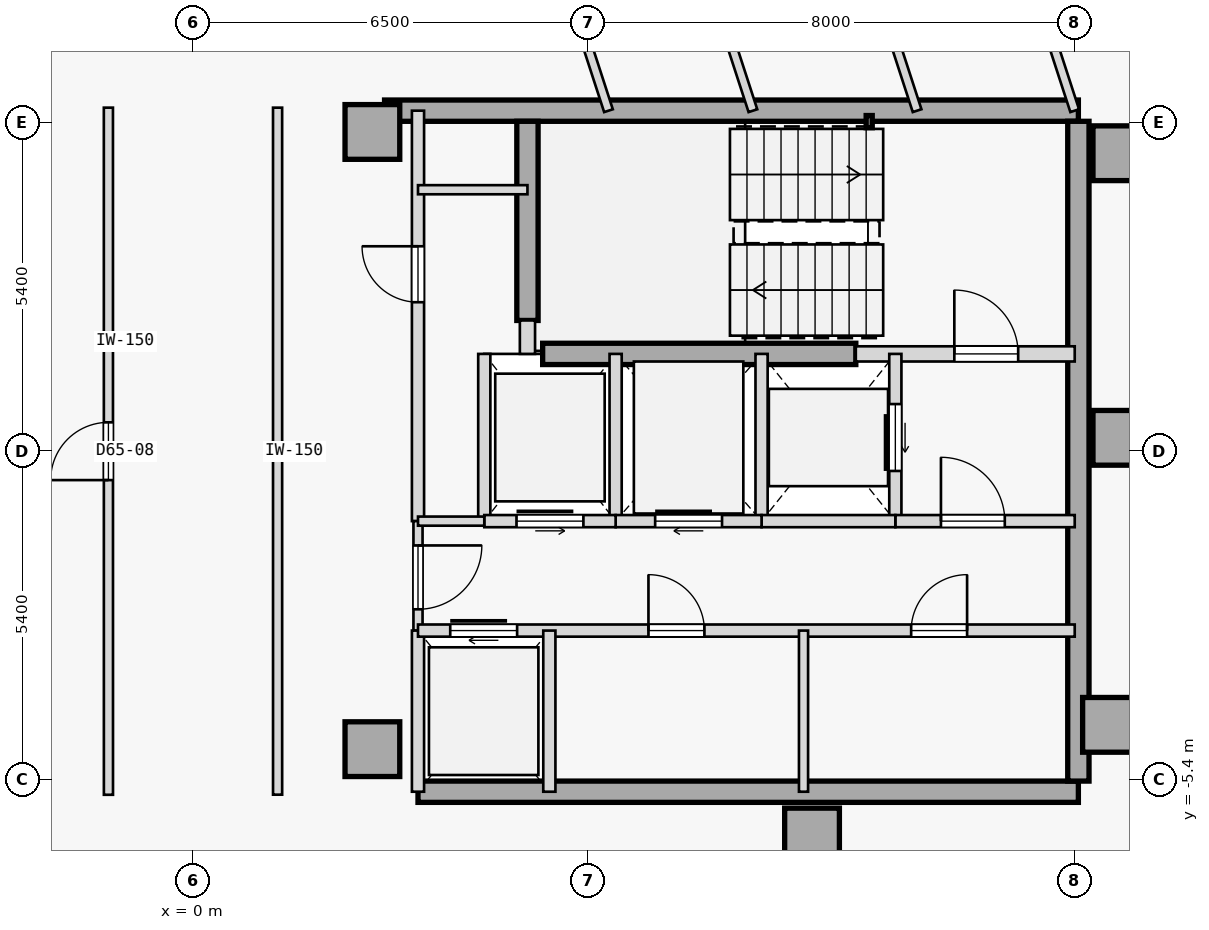
"""IFC4 building model, lengths in metres.
Left out: names, types, materials, properties, quantities, classifications, styles, units other than length and angle.
Written with IfcOpenShell. Run it as: python <this file> out.ifc"""

import sys

from ifc_helpers import new_model, si_unit, direction, frame, frame_2d, origin, origin_2d, place, context, subcontext, project, spatial, rectangle, hollow_rectangle, extrude, element, fill, save


model = new_model("IFC4")
c1 = context("Model", 3, precision=1e-05, world=origin(), true_north=direction((0.0, 1.0)))
c2 = subcontext(c1, "Body", "Model", "MODEL_VIEW")
j1 = project(units=[si_unit("LENGTHUNIT", "METRE"), si_unit("PLANEANGLEUNIT", "RADIAN")], contexts=[c1])
p1 = place(None, origin())
s1 = spatial("IfcSite", under=j1, at=p1, CompositionType="ELEMENT")
p2 = place(p1, origin())
s2 = spatial("IfcBuilding", under=s1, at=p2, CompositionType="ELEMENT")
p3 = place(p2, frame((0.0, 0.0, 244.4)))
s3 = spatial("IfcBuildingStorey", under=s2, at=p3, CompositionType="ELEMENT", Elevation=244.4)
for number, where, z_axis, x_axis in (
    (1, (15.25, 4.9, 0.0), (0.0, 0.0, 1.0), (1.0, 0.0, 0.0)),
    (2, (15.25, 0.22, 0.0), (0.0, 0.0, 1.0), (1.0, 0.0, 0.0)),
    (3, (15.08, -4.5, 0.0), (0.0, 0.0, 1.0), (1.0, 0.0, 0.0)),
    (4, (10.18, -6.32, 0.0), (0.0, 0.0, 1.0), (1.0, 0.0, 0.0)),
    (5, (2.95, -4.9, 0.0), (0.0, 0.0, 1.0), (1.0, 0.0, 0.0)),
    (6, (2.95, 5.25, 0.0), (0.0, 0.0, 1.0), (1.0, 0.0, 0.0)),
):
    element("IfcColumn", number, at=place(p3, frame(where, z_axis=z_axis, x_axis=x_axis)), inside=s3, PredefinedType="COLUMN", context=c2, shape_type="SweptSolid", body=[
        extrude(rectangle(XDim=0.9, YDim=0.9, at=origin_2d()), origin(), (0.0, 0.0, 1.0), 3.35),
    ])
p4 = place(p3, frame((3.15, 5.6, 0.0), z_axis=(0.0, 0.0, 1.0), x_axis=(1.0, 0.0, 0.0)))
e7 = element("IfcWall", 7, at=p4, inside=s3, PredefinedType="SHEAR", context=c2, shape_type="SweptSolid", body=[
    extrude(rectangle(XDim=11.41, YDim=0.35, at=frame_2d((5.705, 0.0))), origin(), (0.0, 0.0, 1.0), 3.125),
])
p5 = place(p3, frame((3.7, -5.6, 0.0), z_axis=(0.0, 0.0, 1.0), x_axis=(1.0, 0.0, 0.0)))
e8 = element("IfcWall", 8, at=p5, inside=s3, PredefinedType="SHEAR", context=c2, shape_type="SweptSolid", body=[
    extrude(rectangle(XDim=10.86, YDim=0.35, at=frame_2d((5.43, 0.0))), origin(), (0.0, 0.0, 1.0), 3.125),
])
p6 = place(p3, frame((14.56, -5.425, 0.0), z_axis=(0.0, 0.0, 1.0), x_axis=(0.0, 1.0, 0.0)))
e9 = element("IfcWall", 9, at=p6, inside=s3, PredefinedType="SHEAR", context=c2, shape_type="SweptSolid", body=[
    extrude(rectangle(XDim=10.85, YDim=0.35, at=frame_2d((5.425, 0.0))), origin(), (0.0, 0.0, 1.0), 3.125),
])
p7 = place(p3, frame((5.5, 2.15, 0.0), z_axis=(0.0, 0.0, 1.0), x_axis=(0.0, 1.0, 0.0)))
e10 = element("IfcWall", 10, at=p7, inside=s3, PredefinedType="SHEAR", context=c2, shape_type="SweptSolid", body=[
    extrude(rectangle(XDim=3.275, YDim=0.35, at=frame_2d((1.638, 0.0))), origin(), (0.0, 0.0, 1.0), 3.125),
])
p8 = place(p3, frame((5.75, 1.6, 0.0), z_axis=(0.0, 0.0, 1.0), x_axis=(1.0, 0.0, 0.0)))
e11 = element("IfcWall", 11, at=p8, inside=s3, PredefinedType="SHEAR", context=c2, shape_type="SweptSolid", body=[
    extrude(rectangle(XDim=5.15, YDim=0.35, at=frame_2d((2.575, 0.0))), origin(), (0.0, 0.0, 1.0), 3.125),
])
p9 = place(p3, frame((11.12, 5.42, 0.0), z_axis=(0.0, 0.0, 1.0), x_axis=(1.0, 0.0, 0.0)))
e12 = element("IfcColumn", 12, at=p9, inside=s3, PredefinedType="COLUMN", context=c2, shape_type="SweptSolid", body=[
    extrude(hollow_rectangle(XDim=0.1, YDim=0.2, WallThickness=0.008, at=origin_2d()), origin(), (0.0, 0.0, 1.0), 3.35),
])
p10 = place(p3, frame((10.9, 1.6, 0.0), z_axis=(0.0, 0.0, 1.0), x_axis=(1.0, 0.0, 0.0)))
e13 = element("IfcWall", 13, at=p10, inside=s3, PredefinedType="STANDARD", context=c2, shape_type="SweptSolid", body=[
    extrude(rectangle(XDim=3.6, YDim=0.25, at=frame_2d((1.8, 0.0))), origin(), (0.0, 0.0, 1.0), 3.125),
])
p11 = place(p10, frame((1.62, 0.0, 0.0)))
e14 = element("IfcOpeningElement", 14, at=p11, cuts=e13, PredefinedType="OPENING", context=c2, shape_type="SweptSolid", body=[
    extrude(rectangle(XDim=1.05, YDim=2.15, at=frame_2d((0.525, 1.075))), frame((0.0, 0.135, 0.0), z_axis=(0.0, -1.0, 0.0), x_axis=(1.0, 0.0, 0.0)), (0.0, 0.0, 1.0), 0.27),
])
p12 = place(p3, frame((5.5, 1.6, 0.0), z_axis=(0.0, 0.0, 1.0), x_axis=(0.0, 1.0, 0.0)))
e15 = element("IfcWall", 15, at=p12, inside=s3, PredefinedType="STANDARD", context=c2, shape_type="SweptSolid", body=[
    extrude(rectangle(XDim=0.55, YDim=0.25, at=frame_2d((0.275, 0.0))), origin(), (0.0, 0.0, 1.0), 3.125),
])
p13 = place(p3, frame((3.7, -1.15, 0.0), z_axis=(0.0, 0.0, 1.0), x_axis=(0.0, 1.0, 0.0)))
e16 = element("IfcWall", 16, at=p13, inside=s3, PredefinedType="STANDARD", context=c2, shape_type="SweptSolid", body=[
    extrude(rectangle(XDim=6.75, YDim=0.2, at=frame_2d((3.375, 0.0))), origin(), (0.0, 0.0, 1.0), 3.125),
])
p14 = place(p13, frame((3.6, 0.0, 0.0)))
e17 = element("IfcOpeningElement", 17, at=p14, cuts=e16, PredefinedType="OPENING", context=c2, shape_type="SweptSolid", body=[
    extrude(rectangle(XDim=0.92, YDim=2.15, at=frame_2d((0.46, 1.075))), frame((0.0, 0.11, 0.0), z_axis=(0.0, -1.0, 0.0), x_axis=(1.0, 0.0, 0.0)), (0.0, 0.0, 1.0), 0.22),
])
p15 = place(p3, frame((3.7, -2.95, 0.0), z_axis=(0.0, 0.0, 1.0), x_axis=(0.0, 1.0, 0.0)))
e18 = element("IfcWall", 18, at=p15, inside=s3, PredefinedType="PARTITIONING", context=c2, shape_type="SweptSolid", body=[
    extrude(rectangle(XDim=1.8, YDim=0.15, at=frame_2d((0.9, 0.0))), origin(), (0.0, 0.0, 1.0), 3.125),
])
p16 = place(p15, frame((0.35, 0.0, 0.0)))
e19 = element("IfcOpeningElement", 19, at=p16, cuts=e18, PredefinedType="OPENING", context=c2, shape_type="SweptSolid", body=[
    extrude(rectangle(XDim=1.05, YDim=2.18, at=frame_2d((0.525, 1.09))), frame((0.0, 0.085, 0.0), z_axis=(0.0, -1.0, 0.0), x_axis=(1.0, 0.0, 0.0)), (0.0, 0.0, 1.0), 0.17),
])
p17 = place(p3, frame((3.7, -5.6, 0.0), z_axis=(0.0, 0.0, 1.0), x_axis=(0.0, 1.0, 0.0)))
e20 = element("IfcWall", 20, at=p17, inside=s3, PredefinedType="STANDARD", context=c2, shape_type="SweptSolid", body=[
    extrude(rectangle(XDim=2.65, YDim=0.2, at=frame_2d((1.325, 0.0))), origin(), (0.0, 0.0, 1.0), 3.125),
])
p18 = place(p3, frame((11.55, -1.15, 0.0), z_axis=(0.0, 0.0, 1.0), x_axis=(0.0, 1.0, 0.0)))
e21 = element("IfcWall", 21, at=p18, inside=s3, PredefinedType="STANDARD", context=c2, shape_type="SweptSolid", body=[
    extrude(rectangle(XDim=2.75, YDim=0.2, at=frame_2d((1.375, 0.0))), origin(), (0.0, 0.0, 1.0), 3.125),
])
p19 = place(p18, frame((0.825, 0.0, 0.0)))
e22 = element("IfcOpeningElement", 22, at=p19, cuts=e21, PredefinedType="OPENING", context=c2, shape_type="SweptSolid", body=[
    extrude(rectangle(XDim=1.1, YDim=2.15, at=frame_2d((0.55, 1.075))), frame((0.0, 0.11, 0.0), z_axis=(0.0, -1.0, 0.0), x_axis=(1.0, 0.0, 0.0)), (0.0, 0.0, 1.0), 0.22),
])
p20 = place(p3, frame((9.35, -1.15, 0.0), z_axis=(0.0, 0.0, 1.0), x_axis=(0.0, 1.0, 0.0)))
e23 = element("IfcWall", 23, at=p20, inside=s3, PredefinedType="STANDARD", context=c2, shape_type="SweptSolid", body=[
    extrude(rectangle(XDim=2.75, YDim=0.2, at=frame_2d((1.375, 0.0))), origin(), (0.0, 0.0, 1.0), 3.125),
])
p21 = place(p3, frame((11.55, -1.15, 0.0), z_axis=(0.0, 0.0, 1.0), x_axis=(1.0, 0.0, 0.0)))
e24 = element("IfcWall", 24, at=p21, inside=s3, PredefinedType="STANDARD", context=c2, shape_type="SweptSolid", body=[
    extrude(rectangle(XDim=2.95, YDim=0.2, at=frame_2d((1.475, 0.0))), origin(), (0.0, 0.0, 1.0), 3.125),
])
p22 = place(p21, frame((0.75, 0.0, 0.0)))
e25 = element("IfcOpeningElement", 25, at=p22, cuts=e24, PredefinedType="OPENING", context=c2, shape_type="SweptSolid", body=[
    extrude(rectangle(XDim=1.05, YDim=2.18, at=frame_2d((0.525, 1.09))), frame((0.0, 0.11, 0.0), z_axis=(0.0, -1.0, 0.0), x_axis=(1.0, 0.0, 0.0)), (0.0, 0.0, 1.0), 0.22),
])
p23 = place(p3, frame((9.35, -1.15, 0.0), z_axis=(0.0, 0.0, 1.0), x_axis=(1.0, 0.0, 0.0)))
e26 = element("IfcWall", 26, at=p23, inside=s3, PredefinedType="STANDARD", context=c2, shape_type="SweptSolid", body=[
    extrude(rectangle(XDim=2.2, YDim=0.2, at=frame_2d((1.1, 0.0))), origin(), (0.0, 0.0, 1.0), 3.125),
])
p24 = place(p3, frame((6.95, -1.15, 0.0), z_axis=(0.0, 0.0, 1.0), x_axis=(0.0, 1.0, 0.0)))
e27 = element("IfcWall", 27, at=p24, inside=s3, PredefinedType="STANDARD", context=c2, shape_type="SweptSolid", body=[
    extrude(rectangle(XDim=2.75, YDim=0.2, at=frame_2d((1.375, 0.0))), origin(), (0.0, 0.0, 1.0), 3.125),
])
p25 = place(p3, frame((6.95, -1.15, 0.0), z_axis=(0.0, 0.0, 1.0), x_axis=(1.0, 0.0, 0.0)))
e28 = element("IfcWall", 28, at=p25, inside=s3, PredefinedType="STANDARD", context=c2, shape_type="SweptSolid", body=[
    extrude(rectangle(XDim=2.4, YDim=0.2, at=frame_2d((1.2, 0.0))), origin(), (0.0, 0.0, 1.0), 3.125),
])
p26 = place(p25, frame((0.65, 0.0, 0.0)))
e29 = element("IfcOpeningElement", 29, at=p26, cuts=e28, PredefinedType="OPENING", context=c2, shape_type="SweptSolid", body=[
    extrude(rectangle(XDim=1.1, YDim=2.15, at=frame_2d((0.55, 1.075))), frame((0.0, 0.11, 0.0), z_axis=(0.0, -1.0, 0.0), x_axis=(1.0, 0.0, 0.0)), (0.0, 0.0, 1.0), 0.22),
])
p27 = place(p3, frame((4.79, -1.15, 0.0), z_axis=(0.0, 0.0, 1.0), x_axis=(0.0, 1.0, 0.0)))
e30 = element("IfcWall", 30, at=p27, inside=s3, PredefinedType="STANDARD", context=c2, shape_type="SweptSolid", body=[
    extrude(rectangle(XDim=2.75, YDim=0.2, at=frame_2d((1.375, 0.0))), origin(), (0.0, 0.0, 1.0), 3.125),
])
p28 = place(p3, frame((4.79, -1.15, 0.0), z_axis=(0.0, 0.0, 1.0), x_axis=(1.0, 0.0, 0.0)))
e31 = element("IfcWall", 31, at=p28, inside=s3, PredefinedType="STANDARD", context=c2, shape_type="SweptSolid", body=[
    extrude(rectangle(XDim=2.16, YDim=0.2, at=frame_2d((1.08, 0.0))), origin(), (0.0, 0.0, 1.0), 3.125),
])
p29 = place(p28, frame((0.53, 0.0, 0.0)))
e32 = element("IfcOpeningElement", 32, at=p29, cuts=e31, PredefinedType="OPENING", context=c2, shape_type="SweptSolid", body=[
    extrude(rectangle(XDim=1.1, YDim=2.15, at=frame_2d((0.55, 1.075))), frame((0.0, 0.11, 0.0), z_axis=(0.0, -1.0, 0.0), x_axis=(1.0, 0.0, 0.0)), (0.0, 0.0, 1.0), 0.22),
])
p30 = place(p3, frame((3.7, -1.15, 0.0), z_axis=(0.0, 0.0, 1.0), x_axis=(1.0, 0.0, 0.0)))
e33 = element("IfcWall", 33, at=p30, inside=s3, PredefinedType="PARTITIONING", context=c2, shape_type="SweptSolid", body=[
    extrude(rectangle(XDim=1.09, YDim=0.15, at=frame_2d((0.545, 0.0))), origin(), (0.0, 0.0, 1.0), 3.125),
])
p31 = place(p3, frame((3.7, -2.95, 0.0), z_axis=(0.0, 0.0, 1.0), x_axis=(1.0, 0.0, 0.0)))
e34 = element("IfcWall", 34, at=p31, inside=s3, PredefinedType="STANDARD", context=c2, shape_type="SweptSolid", body=[
    extrude(rectangle(XDim=10.8, YDim=0.2, at=frame_2d((5.4, 0.0))), origin(), (0.0, 0.0, 1.0), 3.125),
])
p32 = place(p31, frame((0.53, 0.0, 0.0)))
e35 = element("IfcOpeningElement", 35, at=p32, cuts=e34, PredefinedType="OPENING", context=c2, shape_type="SweptSolid", body=[
    extrude(rectangle(XDim=1.1, YDim=2.15, at=frame_2d((0.55, 1.075))), frame((0.0, 0.11, 0.0), z_axis=(0.0, -1.0, 0.0), x_axis=(1.0, 0.0, 0.0)), (0.0, 0.0, 1.0), 0.22),
])
p33 = place(p31, frame((3.79, 0.0, 0.0)))
e36 = element("IfcOpeningElement", 36, at=p33, cuts=e34, PredefinedType="OPENING", context=c2, shape_type="SweptSolid", body=[
    extrude(rectangle(XDim=0.92, YDim=2.15, at=frame_2d((0.46, 1.075))), frame((0.0, 0.11, 0.0), z_axis=(0.0, -1.0, 0.0), x_axis=(1.0, 0.0, 0.0)), (0.0, 0.0, 1.0), 0.22),
])
p34 = place(p31, frame((8.11, 0.0, 0.0)))
e37 = element("IfcOpeningElement", 37, at=p34, cuts=e34, PredefinedType="OPENING", context=c2, shape_type="SweptSolid", body=[
    extrude(rectangle(XDim=0.92, YDim=2.15, at=frame_2d((0.46, 1.075))), frame((0.0, 0.11, 0.0), z_axis=(0.0, -1.0, 0.0), x_axis=(1.0, 0.0, 0.0)), (0.0, 0.0, 1.0), 0.22),
])
p35 = place(p3, frame((5.86, -5.6, 0.0), z_axis=(0.0, 0.0, 1.0), x_axis=(0.0, 1.0, 0.0)))
e38 = element("IfcWall", 38, at=p35, inside=s3, PredefinedType="STANDARD", context=c2, shape_type="SweptSolid", body=[
    extrude(rectangle(XDim=2.65, YDim=0.2, at=frame_2d((1.325, 0.0))), origin(), (0.0, 0.0, 1.0), 3.125),
])
p36 = place(p3, frame((10.04, -5.6, 0.0), z_axis=(0.0, 0.0, 1.0), x_axis=(0.0, 1.0, 0.0)))
e39 = element("IfcWall", 39, at=p36, inside=s3, PredefinedType="PARTITIONING", context=c2, shape_type="SweptSolid", body=[
    extrude(rectangle(XDim=2.65, YDim=0.15, at=frame_2d((1.325, 0.0))), origin(), (0.0, 0.0, 1.0), 3.125),
])
p37 = place(p3, frame((3.7, 4.3, 0.0), z_axis=(0.0, 0.0, 1.0), x_axis=(1.0, 0.0, 0.0)))
e40 = element("IfcWall", 40, at=p37, inside=s3, PredefinedType="PARTITIONING", context=c2, shape_type="SweptSolid", body=[
    extrude(rectangle(XDim=1.8, YDim=0.15, at=frame_2d((0.9, 0.0))), origin(), (0.0, 0.0, 1.0), 3.125),
])
p38 = place(p3, frame((-1.391, -5.65, 0.0), z_axis=(0.0, 0.0, 1.0), x_axis=(-8.6422954e-05, 0.999999996266, 0.0)))
e41 = element("IfcWall", 41, at=p38, inside=s3, PredefinedType="PARTITIONING", context=c2, shape_type="SweptSolid", body=[
    extrude(rectangle(XDim=11.3, YDim=0.15, at=frame_2d((5.65, 0.0))), origin(), (0.0, 0.0, 1.0), 3.125),
])
p39 = place(p38, frame((5.175, 0.0, 0.0)))
e42 = element("IfcOpeningElement", 42, at=p39, cuts=e41, PredefinedType="OPENING", context=c2, shape_type="SweptSolid", body=[
    extrude(rectangle(XDim=0.95, YDim=2.15, at=frame_2d((0.475, 1.075))), frame((0.0, 0.085, 0.0), z_axis=(0.0, -1.0, 0.0), x_axis=(1.0, 0.0, 0.0)), (0.0, 0.0, 1.0), 0.17),
])
p40 = place(p3, frame((1.391, -5.648, 0.0), z_axis=(0.0, 0.0, 1.0), x_axis=(-4.3218947e-05, 0.999999999066, 0.0)))
e43 = element("IfcWall", 43, at=p40, inside=s3, PredefinedType="PARTITIONING", context=c2, shape_type="SweptSolid", body=[
    extrude(rectangle(XDim=11.298, YDim=0.15, at=frame_2d((5.649, 0.0))), origin(), (0.0, 0.0, 1.0), 3.125),
])
p41 = place(p3, frame((12.517, -7.948, 0.0), z_axis=(0.0, 0.0, 1.0), x_axis=(0.951053764264, 0.309025464128, 0.0)))
e44 = element("IfcWall", 44, at=p41, inside=s3, PredefinedType="PARTITIONING", context=c2, shape_type="SweptSolid", body=[
    extrude(rectangle(XDim=18.399, YDim=0.15, at=frame_2d((9.2, 0.0))), origin(), (0.0, 0.0, 1.0), 3.125),
])
p42 = place(p41, frame((8.725, 0.0, 0.0)))
e45 = element("IfcOpeningElement", 45, at=p42, cuts=e44, PredefinedType="OPENING", context=c2, shape_type="SweptSolid", body=[
    extrude(rectangle(XDim=0.95, YDim=2.15, at=frame_2d((0.475, 1.075))), frame((0.0, 0.085, 0.0), z_axis=(0.0, -1.0, 0.0), x_axis=(1.0, 0.0, 0.0)), (0.0, 0.0, 1.0), 0.17),
])
p43 = place(p3, frame((6.833, 5.6, 0.0), z_axis=(0.0, 0.0, 1.0), x_axis=(-0.309019923183, 0.951055564663, 0.0)))
e46 = element("IfcWall", 46, at=p43, inside=s3, PredefinedType="PARTITIONING", context=c2, shape_type="SweptSolid", body=[
    extrude(rectangle(XDim=6.593, YDim=0.15, at=frame_2d((3.296, 0.0))), origin(), (0.0, 0.0, 1.0), 2.675),
])
p44 = place(p3, frame((9.208, 5.6, 0.0), z_axis=(0.0, 0.0, 1.0), x_axis=(-0.309021275068, 0.951055125403, 0.0)))
e47 = element("IfcWall", 47, at=p44, inside=s3, PredefinedType="PARTITIONING", context=c2, shape_type="SweptSolid", body=[
    extrude(rectangle(XDim=7.327, YDim=0.15, at=frame_2d((3.664, 0.0))), origin(), (0.0, 0.0, 1.0), 3.125),
])
p45 = place(p3, frame((11.908, 5.6, 0.0), z_axis=(0.0, 0.0, 1.0), x_axis=(-0.308994076163, 0.951063962568, 0.0)))
e48 = element("IfcWall", 48, at=p45, inside=s3, PredefinedType="PARTITIONING", context=c2, shape_type="SweptSolid", body=[
    extrude(rectangle(XDim=8.161, YDim=0.15, at=frame_2d((4.081, 0.0))), origin(), (0.0, 0.0, 1.0), 3.125),
])
p46 = place(p3, frame((14.5, 5.6, 0.0), z_axis=(0.0, 0.0, 1.0), x_axis=(-0.309015253813, 0.951057081836, 0.0)))
e49 = element("IfcWall", 49, at=p46, inside=s3, PredefinedType="PARTITIONING", context=c2, shape_type="SweptSolid", body=[
    extrude(rectangle(XDim=3.274, YDim=0.15, at=frame_2d((1.637, 0.0))), origin(), (0.0, 0.0, 1.0), 3.125),
])
p47 = place(p3, frame((14.821, 4.61, 0.0), z_axis=(0.0, 0.0, 1.0), x_axis=(0.951063700751, 0.30899488202, 0.0)))
e50 = element("IfcWall", 50, at=p47, inside=s3, PredefinedType="PARTITIONING", context=c2, shape_type="SweptSolid", body=[
    extrude(rectangle(XDim=10.352, YDim=0.15, at=frame_2d((5.176, 0.0))), origin(), (0.0, 0.0, 1.0), 3.125),
])
p48 = place(p47, frame((4.716, 0.0, 0.0)))
e51 = element("IfcOpeningElement", 51, at=p48, cuts=e50, PredefinedType="OPENING", context=c2, shape_type="SweptSolid", body=[
    extrude(rectangle(XDim=0.92, YDim=2.15, at=frame_2d((0.46, 1.075))), frame((0.0, 0.085, 0.0), z_axis=(0.0, -1.0, 0.0), x_axis=(1.0, 0.0, 0.0)), (0.0, 0.0, 1.0), 0.17),
])
p49 = place(p11, origin())
e52 = element("IfcDoor", 52, at=p49, inside=s3, OperationType="SINGLE_SWING_LEFT", PredefinedType="DOOR", context=c2, shape_type="SweptSolid", body=[
    extrude(rectangle(XDim=1.05, YDim=2.15, at=frame_2d((0.525, 1.075))), frame((0.0, 0.025, 0.0), z_axis=(0.0, -1.0, 0.0), x_axis=(1.0, 0.0, 0.0)), (0.0, 0.0, 1.0), 0.05),
])
fill(e14, e52)
p50 = place(p22, origin())
e53 = element("IfcDoor", 53, at=p50, inside=s3, OperationType="SINGLE_SWING_LEFT", PredefinedType="DOOR", context=c2, shape_type="SweptSolid", body=[
    extrude(rectangle(XDim=1.05, YDim=2.18, at=frame_2d((0.525, 1.09))), frame((0.0, 0.025, 0.0), z_axis=(0.0, -1.0, 0.0), x_axis=(1.0, 0.0, 0.0)), (0.0, 0.0, 1.0), 0.05),
])
fill(e25, e53)
p51 = place(p16, frame((1.05, 0.0, 0.0), z_axis=(0.0, 0.0, 1.0), x_axis=(-1.0, 0.0, 0.0)))
e54 = element("IfcDoor", 54, at=p51, inside=s3, OperationType="SINGLE_SWING_RIGHT", PredefinedType="DOOR", context=c2, shape_type="SweptSolid", body=[
    extrude(rectangle(XDim=1.05, YDim=2.18, at=frame_2d((0.525, 1.09))), frame((0.0, 0.025, 0.0), z_axis=(0.0, -1.0, 0.0), x_axis=(1.0, 0.0, 0.0)), (0.0, 0.0, 1.0), 0.05),
])
fill(e19, e54)
p52 = place(p19, origin())
e55 = element("IfcDoor", 55, at=p52, inside=s3, OperationType="SLIDING_TO_RIGHT", PredefinedType="DOOR", context=c2, shape_type="SweptSolid", body=[
    extrude(rectangle(XDim=1.1, YDim=2.15, at=frame_2d((0.55, 1.075))), frame((0.0, 0.025, 0.0), z_axis=(0.0, -1.0, 0.0), x_axis=(1.0, 0.0, 0.0)), (0.0, 0.0, 1.0), 0.05),
])
fill(e22, e55)
p53 = place(p26, origin())
e56 = element("IfcDoor", 56, at=p53, inside=s3, OperationType="SLIDING_TO_RIGHT", PredefinedType="DOOR", context=c2, shape_type="SweptSolid", body=[
    extrude(rectangle(XDim=1.1, YDim=2.15, at=frame_2d((0.55, 1.075))), frame((0.0, 0.025, 0.0), z_axis=(0.0, -1.0, 0.0), x_axis=(1.0, 0.0, 0.0)), (0.0, 0.0, 1.0), 0.05),
])
fill(e29, e56)
p54 = place(p29, origin())
e57 = element("IfcDoor", 57, at=p54, inside=s3, OperationType="SLIDING_TO_LEFT", PredefinedType="DOOR", context=c2, shape_type="SweptSolid", body=[
    extrude(rectangle(XDim=1.1, YDim=2.15, at=frame_2d((0.55, 1.075))), frame((0.0, 0.025, 0.0), z_axis=(0.0, -1.0, 0.0), x_axis=(1.0, 0.0, 0.0)), (0.0, 0.0, 1.0), 0.05),
])
fill(e32, e57)
p55 = place(p32, origin())
e58 = element("IfcDoor", 58, at=p55, inside=s3, OperationType="SLIDING_TO_RIGHT", PredefinedType="DOOR", context=c2, shape_type="SweptSolid", body=[
    extrude(rectangle(XDim=1.1, YDim=2.15, at=frame_2d((0.55, 1.075))), frame((0.0, 0.025, 0.0), z_axis=(0.0, -1.0, 0.0), x_axis=(1.0, 0.0, 0.0)), (0.0, 0.0, 1.0), 0.05),
])
fill(e35, e58)
p56 = place(p33, origin())
e59 = element("IfcDoor", 59, at=p56, inside=s3, OperationType="SINGLE_SWING_LEFT", PredefinedType="DOOR", context=c2, shape_type="SweptSolid", body=[
    extrude(rectangle(XDim=0.92, YDim=2.15, at=frame_2d((0.46, 1.075))), frame((0.0, 0.025, 0.0), z_axis=(0.0, -1.0, 0.0), x_axis=(1.0, 0.0, 0.0)), (0.0, 0.0, 1.0), 0.05),
])
fill(e36, e59)
p57 = place(p34, origin())
e60 = element("IfcDoor", 60, at=p57, inside=s3, OperationType="SINGLE_SWING_RIGHT", PredefinedType="DOOR", context=c2, shape_type="SweptSolid", body=[
    extrude(rectangle(XDim=0.92, YDim=2.15, at=frame_2d((0.46, 1.075))), frame((0.0, 0.025, 0.0), z_axis=(0.0, -1.0, 0.0), x_axis=(1.0, 0.0, 0.0)), (0.0, 0.0, 1.0), 0.05),
])
fill(e37, e60)
p58 = place(p14, origin())
e61 = element("IfcDoor", 61, at=p58, inside=s3, OperationType="SINGLE_SWING_RIGHT", PredefinedType="DOOR", context=c2, shape_type="SweptSolid", body=[
    extrude(rectangle(XDim=0.92, YDim=2.15, at=frame_2d((0.46, 1.075))), frame((0.0, 0.025, 0.0), z_axis=(0.0, -1.0, 0.0), x_axis=(1.0, 0.0, 0.0)), (0.0, 0.0, 1.0), 0.05),
])
fill(e17, e61)
p59 = place(p39, origin())
e62 = element("IfcDoor", 62, at=p59, inside=s3, OperationType="SINGLE_SWING_LEFT", PredefinedType="DOOR", context=c2, shape_type="SweptSolid", body=[
    extrude(rectangle(XDim=0.95, YDim=2.15, at=frame_2d((0.475, 1.075))), frame((0.0, 0.025, 0.0), z_axis=(0.0, -1.0, 0.0), x_axis=(1.0, 0.0, 0.0)), (0.0, 0.0, 1.0), 0.05),
])
fill(e42, e62)
save(model, sys.argv[1])
